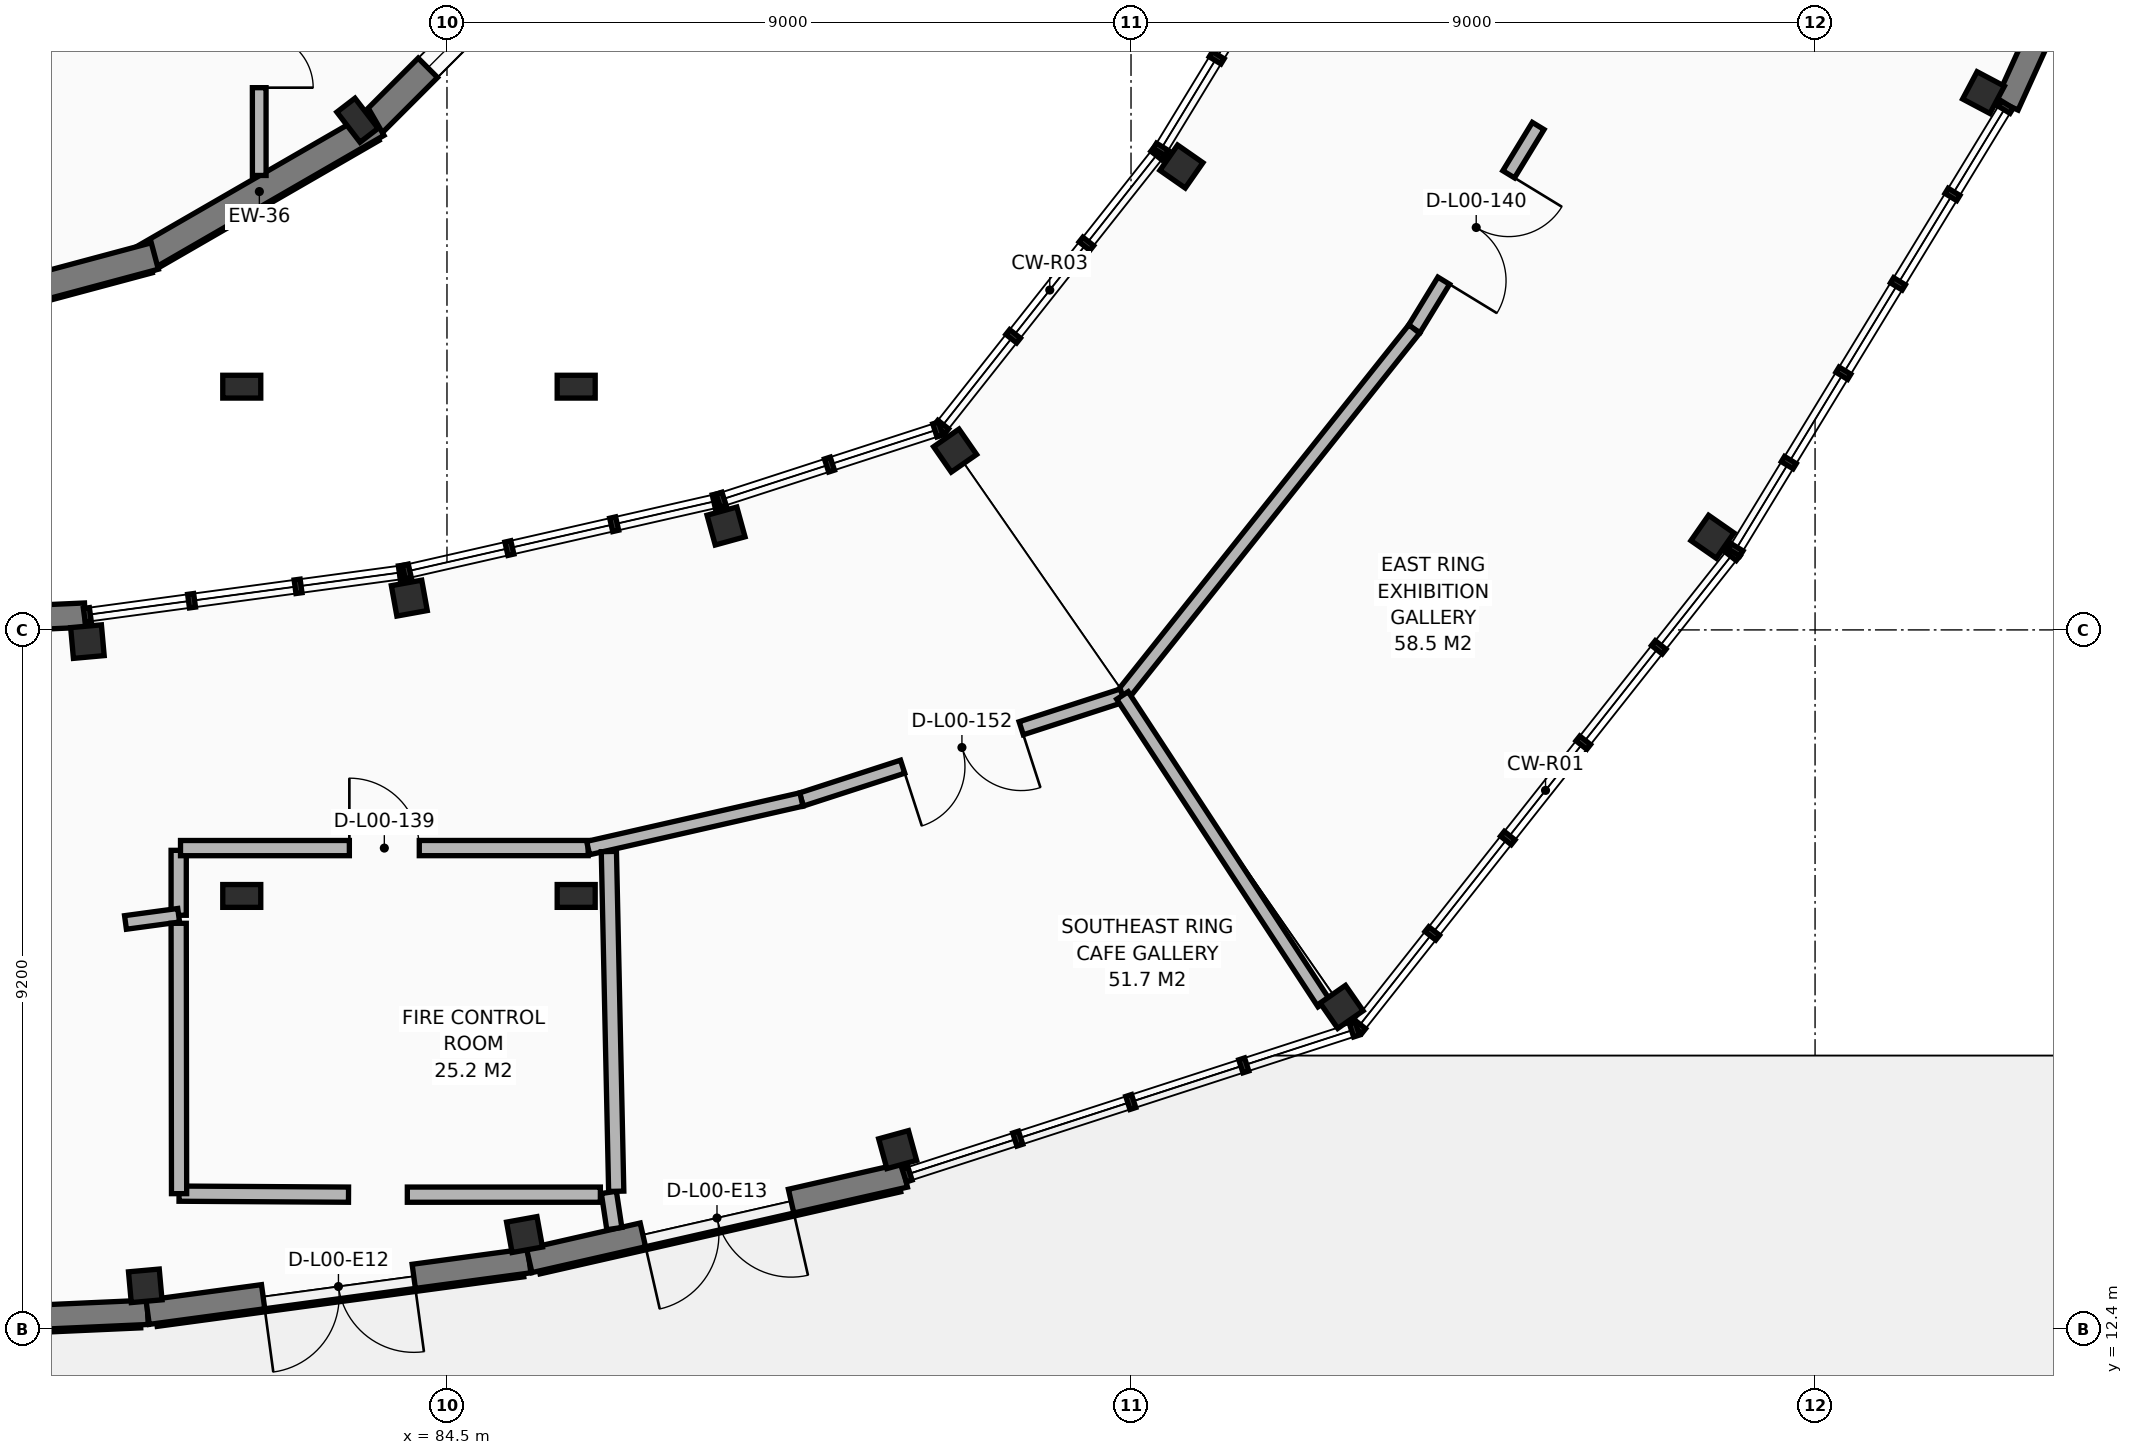
"""IFC4 building model, lengths in metres.
Left out: names, types, materials, properties, quantities, classifications, styles, units other than length and angle.
Written with IfcOpenShell. Run it as: python <this file> out.ifc"""

import sys

from ifc_helpers import new_model, si_unit, direction, frame, frame_2d, origin, origin_2d, place, context, subcontext, project, spatial, rectangle, hollow_circle, i_section, extrude, element, fill, save


model = new_model("IFC4")
c1 = context("Model", 3, precision=1e-05, world=origin(), true_north=direction((0.0, 1.0)))
c2 = subcontext(c1, "Body", "Model", "MODEL_VIEW")
j1 = project(units=[si_unit("LENGTHUNIT", "METRE"), si_unit("PLANEANGLEUNIT", "RADIAN")], contexts=[c1])
p1 = place(None, origin())
s1 = spatial("IfcSite", under=j1, at=p1, CompositionType="ELEMENT")
p2 = place(p1, origin())
s2 = spatial("IfcBuilding", under=s1, at=p2, CompositionType="ELEMENT")
p3 = place(p2, origin())
s3 = spatial("IfcBuildingStorey", under=s2, at=p3, CompositionType="ELEMENT", Elevation=0.0)
for number, where, z_axis, x_axis in (
    (1, (96.271, 16.64, 0.0), (0.0, 0.0, 1.0), (-0.571, 0.821, 0.0)),
    (2, (91.186, 23.959, 0.0), (0.0, 0.0, 1.0), (-0.571, 0.821, 0.0)),
    (3, (101.15, 22.825, 0.0), (0.0, 0.0, 1.0), (-0.82, 0.572, 0.0)),
    (4, (94.163, 27.696, 0.0), (0.0, 0.0, 1.0), (-0.82, 0.572, 0.0)),
    (5, (104.716, 28.669, 0.0), (0.0, 0.0, 1.0), (-0.884, 0.468, 0.0)),
    (6, (80.53, 12.971, 0.0), (0.0, 0.0, 1.0), (-0.089, 0.996, 0.0)),
    (7, (79.769, 21.446, 0.0), (0.0, 0.0, 1.0), (-0.089, 0.996, 0.0)),
    (8, (85.52, 13.645, 0.0), (0.0, 0.0, 1.0), (-0.178, 0.984, 0.0)),
    (9, (84.004, 22.018, 0.0), (0.0, 0.0, 1.0), (-0.178, 0.984, 0.0)),
    (10, (90.43, 14.763, 0.0), (0.0, 0.0, 1.0), (-0.265, 0.964, 0.0)),
    (11, (88.171, 22.967, 0.0), (0.0, 0.0, 1.0), (-0.265, 0.964, 0.0)),
):
    element("IfcColumn", number, at=place(p3, frame(where, z_axis=z_axis, x_axis=x_axis)), inside=s3, PredefinedType="COLUMN", context=c2, shape_type="SweptSolid", body=[
        extrude(hollow_circle(Radius=0.203, WallThickness=0.02, at=origin_2d()), origin(), (0.0, 0.0, 1.0), 5.1),
    ])
for number, where, z_axis, x_axis in (
    (12, (83.323, 28.305, 0.0), (0.0, 0.0, 1.0), (0.609, -0.793, 0.0)),
    (13, (81.8, 18.1, 0.0), (0.0, 0.0, 1.0), (1.0, 0.0, 0.0)),
    (14, (81.8, 24.8, 0.0), (0.0, 0.0, 1.0), (1.0, 0.0, 0.0)),
    (15, (86.2, 18.1, 0.0), (0.0, 0.0, 1.0), (1.0, 0.0, 0.0)),
    (16, (86.2, 24.8, 0.0), (0.0, 0.0, 1.0), (1.0, 0.0, 0.0)),
):
    element("IfcColumn", number, at=place(p3, frame(where, z_axis=z_axis, x_axis=x_axis)), inside=s3, PredefinedType="COLUMN", context=c2, shape_type="SweptSolid", body=[
        extrude(i_section(OverallWidth=0.3, OverallDepth=0.5, WebThickness=0.014, FlangeThickness=0.028, FilletRadius=0.027, at=origin_2d()), origin(), (0.0, 0.0, 1.0), 5.1),
    ])
p4 = place(p3, frame((106.485, 31.72, 0.0), z_axis=(0.0, 0.0, 1.0), x_axis=(-0.413433018277, -0.910534534984, 0.0)))
e17 = element("IfcWall", 17, at=p4, inside=s3, PredefinedType="SOLIDWALL", context=c2, shape_type="SweptSolid", body=[
    extrude(rectangle(XDim=3.531, YDim=0.32, at=frame_2d((1.765, 0.0))), origin(), (0.0, 0.0, 1.0), 4.88),
])
p5 = place(p3, frame((80.562, 12.622, 0.0), z_axis=(0.0, 0.0, 1.0), x_axis=(-0.998999697079, -0.044716945731, 0.0)))
e18 = element("IfcWall", 18, at=p5, inside=s3, PredefinedType="SOLIDWALL", context=c2, shape_type="SweptSolid", body=[
    extrude(rectangle(XDim=5.067, YDim=0.32, at=frame_2d((2.533, 0.0))), origin(), (0.0, 0.0, 1.0), 4.88),
])
p6 = place(p5, frame((1.533, 0.0, 0.0)))
e19 = element("IfcOpeningElement", 19, at=p6, cuts=e18, PredefinedType="OPENING", context=c2, shape_type="SweptSolid", body=[
    extrude(rectangle(XDim=2.0, YDim=2.3, at=frame_2d((1.0, 1.15))), frame((0.0, 0.17, 0.0), z_axis=(0.0, -1.0, 0.0), x_axis=(1.0, 0.0, 0.0)), (0.0, 0.0, 1.0), 0.34),
])
p7 = place(p3, frame((78.48, 21.738, 0.0), z_axis=(0.0, 0.0, 1.0), x_axis=(0.998996725621, 0.044783280345, 0.0)))
e20 = element("IfcWall", 20, at=p7, inside=s3, PredefinedType="SOLIDWALL", context=c2, shape_type="SweptSolid", body=[
    extrude(rectangle(XDim=1.259, YDim=0.32, at=frame_2d((0.63, 0.0))), origin(), (0.0, 0.0, 1.0), 4.88),
])
p8 = place(p3, frame((85.583, 13.301, 0.0), z_axis=(0.0, 0.0, 1.0), x_axis=(-0.990993640205, -0.133908943214, 0.0)))
e21 = element("IfcWall", 21, at=p8, inside=s3, PredefinedType="SOLIDWALL", context=c2, shape_type="SweptSolid", body=[
    extrude(rectangle(XDim=5.067, YDim=0.32, at=frame_2d((2.533, 0.0))), origin(), (0.0, 0.0, 1.0), 4.88),
])
p9 = place(p8, frame((1.533, 0.0, 0.0)))
e22 = element("IfcOpeningElement", 22, at=p9, cuts=e21, PredefinedType="OPENING", context=c2, shape_type="SweptSolid", body=[
    extrude(rectangle(XDim=2.0, YDim=2.3, at=frame_2d((1.0, 1.15))), frame((0.0, 0.17, 0.0), z_axis=(0.0, -1.0, 0.0), x_axis=(1.0, 0.0, 0.0)), (0.0, 0.0, 1.0), 0.34),
])
p10 = place(p3, frame((90.523, 14.425, 0.0), z_axis=(0.0, 0.0, 1.0), x_axis=(-0.975048056311, -0.221993891546, 0.0)))
e23 = element("IfcWall", 23, at=p10, inside=s3, PredefinedType="SOLIDWALL", context=c2, shape_type="SweptSolid", body=[
    extrude(rectangle(XDim=5.067, YDim=0.32, at=frame_2d((2.533, 0.0))), origin(), (0.0, 0.0, 1.0), 4.88),
])
p11 = place(p10, frame((1.533, 0.0, 0.0)))
e24 = element("IfcOpeningElement", 24, at=p11, cuts=e23, PredefinedType="OPENING", context=c2, shape_type="SweptSolid", body=[
    extrude(rectangle(XDim=2.0, YDim=2.3, at=frame_2d((1.0, 1.15))), frame((0.0, 0.17, 0.0), z_axis=(0.0, -1.0, 0.0), x_axis=(1.0, 0.0, 0.0)), (0.0, 0.0, 1.0), 0.34),
])
p12 = place(p3, frame((85.956, 30.702, 0.0), z_axis=(0.0, 0.0, 1.0), x_axis=(-0.707072668406, -0.707140892322, 0.0)))
e25 = element("IfcWall", 25, at=p12, inside=s3, PredefinedType="SOLIDWALL", context=c2, shape_type="SweptSolid", body=[
    extrude(rectangle(XDim=3.579, YDim=0.36, at=frame_2d((1.789, 0.0))), origin(), (0.0, 0.0, 1.0), 4.88),
])
p13 = place(p12, frame((1.164, 0.0, 0.85)))
e26 = element("IfcOpeningElement", 26, at=p13, cuts=e25, PredefinedType="OPENING", context=c2, shape_type="SweptSolid", body=[
    extrude(rectangle(XDim=1.25, YDim=1.7, at=frame_2d((0.625, 0.85))), frame((0.0, 0.19, 0.0), z_axis=(0.0, -1.0, 0.0), x_axis=(1.0, 0.0, 0.0)), (0.0, 0.0, 1.0), 0.38),
])
p14 = place(p3, frame((83.581, 28.262, 0.0), z_axis=(0.0, 0.0, 1.0), x_axis=(-0.866021986329, -0.500005919159, 0.0)))
e27 = element("IfcWall", 27, at=p14, inside=s3, PredefinedType="SOLIDWALL", context=c2, shape_type="SweptSolid", body=[
    extrude(rectangle(XDim=3.579, YDim=0.36, at=frame_2d((1.789, 0.0))), origin(), (0.0, 0.0, 1.0), 4.88),
])
p15 = place(p3, frame((80.656, 26.519, 0.0), z_axis=(0.0, 0.0, 1.0), x_axis=(-0.965924829222, -0.258822766178, 0.0)))
e28 = element("IfcWall", 28, at=p15, inside=s3, PredefinedType="SOLIDWALL", context=c2, shape_type="SweptSolid", body=[
    extrude(rectangle(XDim=2.252, YDim=0.36, at=frame_2d((1.126, 0.0))), origin(), (0.0, 0.0, 1.0), 4.88),
])
p16 = place(p3, frame((80.97, 17.846, 0.0), z_axis=(0.0, 0.0, 1.0), x_axis=(0.0, 1.0, 0.0)))
e29 = element("IfcWall", 29, at=p16, inside=s3, PredefinedType="PARTITIONING", context=c2, shape_type="SweptSolid", body=[
    extrude(rectangle(XDim=0.854, YDim=0.2, at=frame_2d((0.427, 0.0))), origin(), (0.0, 0.0, 1.0), 4.5),
])
p17 = place(p3, frame((80.994, 18.729, 0.0), z_axis=(0.0, 0.0, 1.0), x_axis=(0.999999995856, 9.1041515e-05, 0.0)))
e30 = element("IfcWall", 30, at=p17, inside=s3, PredefinedType="PARTITIONING", context=c2, shape_type="SweptSolid", body=[
    extrude(rectangle(XDim=5.363, YDim=0.2, at=frame_2d((2.682, 0.0))), origin(), (0.0, 0.0, 1.0), 3.96),
])
p18 = place(p17, frame((2.222, 0.0, 0.0)))
e31 = element("IfcOpeningElement", 31, at=p18, cuts=e30, PredefinedType="OPENING", context=c2, shape_type="SweptSolid", body=[
    extrude(rectangle(XDim=0.92, YDim=2.08, at=frame_2d((0.46, 1.04))), frame((0.0, 0.11, 0.0), z_axis=(0.0, -1.0, 0.0), x_axis=(1.0, 0.0, 0.0)), (0.0, 0.0, 1.0), 0.22),
])
p19 = place(p3, frame((98.857, 28.23, 0.0), z_axis=(0.0, 0.0, 1.0), x_axis=(-0.521030331716, -0.853538161673, 0.0)))
e32 = element("IfcWall", 32, at=p19, inside=s3, PredefinedType="PARTITIONING", context=c2, shape_type="SweptSolid", body=[
    extrude(rectangle(XDim=3.13, YDim=0.18, at=frame_2d((1.565, 0.0))), origin(), (0.0, 0.0, 1.0), 4.37),
])
p20 = place(p19, frame((0.745, 0.0, 0.0)))
e33 = element("IfcOpeningElement", 33, at=p20, cuts=e32, PredefinedType="OPENING", context=c2, shape_type="SweptSolid", body=[
    extrude(rectangle(XDim=1.64, YDim=2.2, at=frame_2d((0.82, 1.1))), frame((0.0, 0.1, 0.0), z_axis=(0.0, -1.0, 0.0), x_axis=(1.0, 0.0, 0.0)), (0.0, 0.0, 1.0), 0.2),
])
p21 = place(p3, frame((97.226, 25.558, 0.0), z_axis=(0.0, 0.0, 1.0), x_axis=(-0.622978411473, -0.782239029223, 0.0)))
e34 = element("IfcWall", 34, at=p21, inside=s3, PredefinedType="PARTITIONING", context=c2, shape_type="SweptSolid", body=[
    extrude(rectangle(XDim=6.163, YDim=0.18, at=frame_2d((3.081, 0.0))), origin(), (0.0, 0.0, 1.0), 4.37),
])
p22 = place(p3, frame((93.387, 20.738, 0.0), z_axis=(0.0, 0.0, 1.0), x_axis=(-0.951294745439, -0.308282836532, 0.0)))
e35 = element("IfcWall", 35, at=p22, inside=s3, PredefinedType="PARTITIONING", context=c2, shape_type="SweptSolid", body=[
    extrude(rectangle(XDim=4.44, YDim=0.18, at=frame_2d((2.22, 0.0))), origin(), (0.0, 0.0, 1.0), 4.37),
])
p23 = place(p22, frame((1.4, 0.0, 0.0)))
e36 = element("IfcOpeningElement", 36, at=p23, cuts=e35, PredefinedType="OPENING", context=c2, shape_type="SweptSolid", body=[
    extrude(rectangle(XDim=1.64, YDim=2.2, at=frame_2d((0.82, 1.1))), frame((0.0, 0.1, 0.0), z_axis=(0.0, -1.0, 0.0), x_axis=(1.0, 0.0, 0.0)), (0.0, 0.0, 1.0), 0.2),
])
p24 = place(p3, frame((89.163, 19.369, 0.0), z_axis=(0.0, 0.0, 1.0), x_axis=(-0.975037753208, -0.222039140284, 0.0)))
e37 = element("IfcWall", 37, at=p24, inside=s3, PredefinedType="PARTITIONING", context=c2, shape_type="SweptSolid", body=[
    extrude(rectangle(XDim=2.877, YDim=0.18, at=frame_2d((1.439, 0.0))), origin(), (0.0, 0.0, 1.0), 3.96),
])
p25 = place(p3, frame((80.97, 17.846, 0.0), z_axis=(0.0, 0.0, 1.0), x_axis=(-0.991006067959, -0.133816939393, 0.0)))
e38 = element("IfcWall", 38, at=p25, inside=s3, PredefinedType="PARTITIONING", context=c2, shape_type="SweptSolid", body=[
    extrude(rectangle(XDim=0.706, YDim=0.18, at=frame_2d((0.353, 0.0))), origin(), (0.0, 0.0, 1.0), 4.37),
])
p26 = place(p3, frame((82.029, 31.309, 0.0), z_axis=(0.0, 0.0, 1.0), x_axis=(0.000327267949, -0.999999946448, 0.0)))
e39 = element("IfcWall", 39, at=p26, inside=s3, PredefinedType="PARTITIONING", context=c2, shape_type="SweptSolid", body=[
    extrude(rectangle(XDim=3.73, YDim=0.18, at=frame_2d((1.865, 0.0))), origin(), (0.0, 0.0, 1.0), 4.42),
])
p27 = place(p26, frame((1.155, 0.0, 0.0)))
e40 = element("IfcOpeningElement", 40, at=p27, cuts=e39, PredefinedType="OPENING", context=c2, shape_type="SweptSolid", body=[
    extrude(rectangle(XDim=1.42, YDim=2.18, at=frame_2d((0.71, 1.09))), frame((0.0, 0.1, 0.0), z_axis=(0.0, -1.0, 0.0), x_axis=(1.0, 0.0, 0.0)), (0.0, 0.0, 1.0), 0.2),
])
p28 = place(p3, frame((83.205, 14.17, 0.0), z_axis=(0.0, 0.0, 1.0), x_axis=(-0.999981863572, 0.006022667816, 0.0)))
e41 = element("IfcWall", 41, at=p28, inside=s3, PredefinedType="PARTITIONING", context=c2, shape_type="SweptSolid", body=[
    extrude(rectangle(XDim=2.229, YDim=0.2, at=frame_2d((1.115, 0.0))), origin(), (0.0, 0.0, 1.0), 3.96),
])
p29 = place(p3, frame((80.975, 14.183, 0.0), z_axis=(0.0, 0.0, 1.0), x_axis=(-0.001441514153, 0.999998961018, 0.0)))
e42 = element("IfcWall", 42, at=p29, inside=s3, PredefinedType="PARTITIONING", context=c2, shape_type="SweptSolid", body=[
    extrude(rectangle(XDim=3.557, YDim=0.2, at=frame_2d((1.778, 0.0))), origin(), (0.0, 0.0, 1.0), 4.5),
])
p30 = place(p3, frame((86.63, 14.2, 0.0), z_axis=(0.0, 0.0, 1.0), x_axis=(0.149505115768, -0.988760952081, 0.0)))
e43 = element("IfcWall", 43, at=p30, inside=s3, PredefinedType="PARTITIONING", context=c2, shape_type="SweptSolid", body=[
    extrude(rectangle(XDim=0.482, YDim=0.2, at=frame_2d((0.241, 0.0))), origin(), (0.0, 0.0, 1.0), 4.42),
])
p31 = place(p3, frame((86.518, 14.17, 0.0), z_axis=(0.0, 0.0, 1.0), x_axis=(-1.0, 0.0, 0.0)))
e44 = element("IfcWall", 44, at=p31, inside=s3, PredefinedType="PARTITIONING", context=c2, shape_type="SweptSolid", body=[
    extrude(rectangle(XDim=2.54, YDim=0.2, at=frame_2d((1.27, 0.0))), origin(), (0.0, 0.0, 1.0), 3.96),
])
p32 = place(p3, frame((86.63, 18.684, 0.0), z_axis=(0.0, 0.0, 1.0), x_axis=(0.021679413078, -0.999764973906, 0.0)))
e45 = element("IfcWall", 45, at=p32, inside=s3, PredefinedType="PARTITIONING", context=c2, shape_type="SweptSolid", body=[
    extrude(rectangle(XDim=4.471, YDim=0.2, at=frame_2d((2.235, 0.0))), origin(), (0.0, 0.0, 1.0), 4.42),
])
p33 = place(p3, frame((96.036, 16.69, 0.0), z_axis=(0.0, 0.0, 1.0), x_axis=(-0.547563449624, 0.836764165483, 0.0)))
e46 = element("IfcWall", 46, at=p33, inside=s3, PredefinedType="PARTITIONING", context=c2, shape_type="SweptSolid", body=[
    extrude(rectangle(XDim=4.837, YDim=0.18, at=frame_2d((2.418, 0.0))), origin(), (0.0, 0.0, 1.0), 4.37),
])
p34 = place(p9, origin())
e47 = element("IfcDoor", 47, at=p34, inside=s3, OperationType="DOUBLE_DOOR_SINGLE_SWING", PredefinedType="DOOR", context=c2, shape_type="SweptSolid", body=[
    extrude(rectangle(XDim=2.0, YDim=2.3, at=frame_2d((1.0, 1.15))), frame((0.0, 0.025, 0.0), z_axis=(0.0, -1.0, 0.0), x_axis=(1.0, 0.0, 0.0)), (0.0, 0.0, 1.0), 0.05),
])
fill(e22, e47)
p35 = place(p11, origin())
e48 = element("IfcDoor", 48, at=p35, inside=s3, OperationType="DOUBLE_DOOR_SINGLE_SWING", PredefinedType="DOOR", context=c2, shape_type="SweptSolid", body=[
    extrude(rectangle(XDim=2.0, YDim=2.3, at=frame_2d((1.0, 1.15))), frame((0.0, 0.025, 0.0), z_axis=(0.0, -1.0, 0.0), x_axis=(1.0, 0.0, 0.0)), (0.0, 0.0, 1.0), 0.05),
])
fill(e24, e48)
p36 = place(p13, origin())
e49 = element("IfcWindow", 49, at=p36, inside=s3, PartitioningType="SINGLE_PANEL", PredefinedType="WINDOW", context=c2, shape_type="SweptSolid", body=[
    extrude(rectangle(XDim=1.25, YDim=1.7, at=frame_2d((0.625, 0.85))), frame((0.0, 0.03, 0.0), z_axis=(0.0, -1.0, 0.0), x_axis=(1.0, 0.0, 0.0)), (0.0, 0.0, 1.0), 0.06),
])
fill(e26, e49)
p37 = place(p18, origin())
e50 = element("IfcDoor", 50, at=p37, inside=s3, OperationType="SINGLE_SWING_LEFT", PredefinedType="DOOR", context=c2, shape_type="SweptSolid", body=[
    extrude(rectangle(XDim=0.92, YDim=2.08, at=frame_2d((0.46, 1.04))), frame((0.0, 0.025, 0.0), z_axis=(0.0, -1.0, 0.0), x_axis=(1.0, 0.0, 0.0)), (0.0, 0.0, 1.0), 0.05),
])
fill(e31, e50)
p38 = place(p20, origin())
e51 = element("IfcDoor", 51, at=p38, inside=s3, OperationType="DOUBLE_DOOR_SINGLE_SWING", PredefinedType="DOOR", context=c2, shape_type="SweptSolid", body=[
    extrude(rectangle(XDim=1.64, YDim=2.2, at=frame_2d((0.82, 1.1))), frame((0.0, 0.025, 0.0), z_axis=(0.0, -1.0, 0.0), x_axis=(1.0, 0.0, 0.0)), (0.0, 0.0, 1.0), 0.05),
])
fill(e33, e51)
p39 = place(p23, origin())
e52 = element("IfcDoor", 52, at=p39, inside=s3, OperationType="DOUBLE_DOOR_SINGLE_SWING", PredefinedType="DOOR", context=c2, shape_type="SweptSolid", body=[
    extrude(rectangle(XDim=1.64, YDim=2.2, at=frame_2d((0.82, 1.1))), frame((0.0, 0.025, 0.0), z_axis=(0.0, -1.0, 0.0), x_axis=(1.0, 0.0, 0.0)), (0.0, 0.0, 1.0), 0.05),
])
fill(e36, e52)
p40 = place(p27, origin())
e53 = element("IfcDoor", 53, at=p40, inside=s3, OperationType="DOUBLE_DOOR_SINGLE_SWING", PredefinedType="DOOR", context=c2, shape_type="SweptSolid", body=[
    extrude(rectangle(XDim=1.42, YDim=2.18, at=frame_2d((0.71, 1.09))), frame((0.0, 0.025, 0.0), z_axis=(0.0, -1.0, 0.0), x_axis=(1.0, 0.0, 0.0)), (0.0, 0.0, 1.0), 0.05),
])
fill(e40, e53)
save(model, sys.argv[1])
